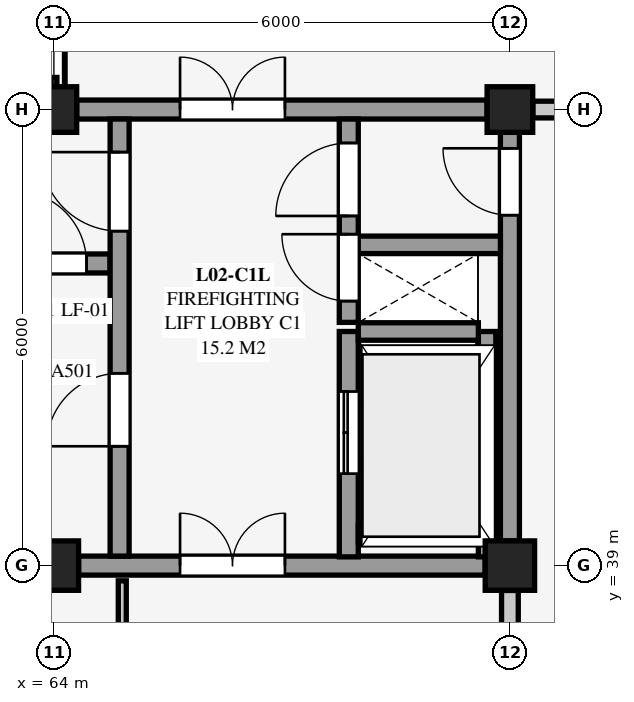
"""IFC4 building model, lengths in metres.
Left out: names, types, materials, properties, quantities, classifications, styles, units other than length and angle.
Written with IfcOpenShell. Run it as: python <this file> out.ifc"""

import sys

from ifc_helpers import new_model, si_unit, direction, frame, frame_2d, origin, origin_2d, place, context, subcontext, project, spatial, rectangle, extrude, element, fill, save


model = new_model("IFC4")
c1 = context("Model", 3, precision=1e-05, world=origin(), true_north=direction((0.0, 1.0)))
c2 = subcontext(c1, "Body", "Model", "MODEL_VIEW")
j1 = project(units=[si_unit("LENGTHUNIT", "METRE"), si_unit("PLANEANGLEUNIT", "RADIAN")], contexts=[c1])
p1 = place(None, origin())
s1 = spatial("IfcSite", under=j1, at=p1, CompositionType="ELEMENT")
p2 = place(p1, origin())
s2 = spatial("IfcBuilding", under=s1, at=p2, CompositionType="ELEMENT")
p3 = place(p2, frame((0.0, 0.0, 4.5)))
s3 = spatial("IfcBuildingStorey", under=s2, at=p3, CompositionType="ELEMENT", Elevation=4.5)
p4 = place(p3, frame((64.0, 39.0, 0.0), z_axis=(0.0, 0.0, 1.0), x_axis=(1.0, 0.0, 0.0)))
e1 = element("IfcColumn", 1, at=p4, inside=s3, PredefinedType="COLUMN", context=c2, shape_type="SweptSolid", body=[
    extrude(rectangle(XDim=0.65, YDim=0.65, at=origin_2d()), origin(), (0.0, 0.0, 1.0), 4.5),
])
p5 = place(p3, frame((64.0, 45.0, 0.0), z_axis=(0.0, 0.0, 1.0), x_axis=(1.0, 0.0, 0.0)))
e2 = element("IfcColumn", 2, at=p5, inside=s3, PredefinedType="COLUMN", context=c2, shape_type="SweptSolid", body=[
    extrude(rectangle(XDim=0.6, YDim=0.6, at=origin_2d()), origin(), (0.0, 0.0, 1.0), 4.5),
])
p6 = place(p3, frame((70.0, 39.0, 0.0), z_axis=(0.0, 0.0, 1.0), x_axis=(1.0, 0.0, 0.0)))
e3 = element("IfcColumn", 3, at=p6, inside=s3, PredefinedType="COLUMN", context=c2, shape_type="SweptSolid", body=[
    extrude(rectangle(XDim=0.65, YDim=0.65, at=origin_2d()), origin(), (0.0, 0.0, 1.0), 4.5),
])
p7 = place(p3, frame((70.0, 45.0, 0.0), z_axis=(0.0, 0.0, 1.0), x_axis=(1.0, 0.0, 0.0)))
e4 = element("IfcColumn", 4, at=p7, inside=s3, PredefinedType="COLUMN", context=c2, shape_type="SweptSolid", body=[
    extrude(rectangle(XDim=0.6, YDim=0.6, at=origin_2d()), origin(), (0.0, 0.0, 1.0), 4.5),
])
p8 = place(p3, frame((64.0, 45.3, 0.0), z_axis=(0.0, 0.0, 1.0), x_axis=(0.0, 1.0, 0.0)))
e5 = element("IfcWall", 5, at=p8, inside=s3, PredefinedType="SOLIDWALL", context=c2, shape_type="SweptSolid", body=[
    extrude(rectangle(XDim=5.425, YDim=0.295, at=frame_2d((2.712, 0.0))), origin(), (0.0, 0.0, 1.0), 0.46),
])
p9 = place(p3, frame((64.325, 39.0, 0.0), z_axis=(0.0, 0.0, 1.0), x_axis=(1.0, 0.0, 0.0)))
e6 = element("IfcWall", 6, at=p9, inside=s3, PredefinedType="SHEAR", context=c2, shape_type="SweptSolid", body=[
    extrude(rectangle(XDim=5.35, YDim=0.25, at=frame_2d((2.675, 0.0))), origin(), (0.0, 0.0, 1.0), 4.228),
])
p10 = place(p9, frame((1.335, 0.0, 0.0)))
e7 = element("IfcOpeningElement", 7, at=p10, cuts=e6, PredefinedType="OPENING", context=c2, shape_type="SweptSolid", body=[
    extrude(rectangle(XDim=1.38, YDim=2.16, at=frame_2d((0.69, 1.08))), frame((0.0, 0.135, 0.0), z_axis=(0.0, -1.0, 0.0), x_axis=(1.0, 0.0, 0.0)), (0.0, 0.0, 1.0), 0.27),
])
p11 = place(p3, frame((64.3, 45.0, 0.0), z_axis=(0.0, 0.0, 1.0), x_axis=(1.0, 0.0, 0.0)))
e8 = element("IfcWall", 8, at=p11, inside=s3, PredefinedType="SHEAR", context=c2, shape_type="SweptSolid", body=[
    extrude(rectangle(XDim=5.4, YDim=0.25, at=frame_2d((2.7, 0.0))), origin(), (0.0, 0.0, 1.0), 4.228),
])
p12 = place(p11, frame((1.36, 0.0, 0.0)))
e9 = element("IfcOpeningElement", 9, at=p12, cuts=e8, PredefinedType="OPENING", context=c2, shape_type="SweptSolid", body=[
    extrude(rectangle(XDim=1.38, YDim=2.16, at=frame_2d((0.69, 1.08))), frame((0.0, 0.135, 0.0), z_axis=(0.0, -1.0, 0.0), x_axis=(1.0, 0.0, 0.0)), (0.0, 0.0, 1.0), 0.27),
])
p13 = place(p3, frame((70.0, 39.325, 0.0), z_axis=(0.0, 0.0, 1.0), x_axis=(0.0, 1.0, 0.0)))
e10 = element("IfcWall", 10, at=p13, inside=s3, PredefinedType="SHEAR", context=c2, shape_type="SweptSolid", body=[
    extrude(rectangle(XDim=5.375, YDim=0.25, at=frame_2d((2.688, 0.0))), origin(), (0.0, 0.0, 1.0), 4.228),
])
p14 = place(p13, frame((4.285, 0.0, 0.0)))
e11 = element("IfcOpeningElement", 11, at=p14, cuts=e10, PredefinedType="OPENING", context=c2, shape_type="SweptSolid", body=[
    extrude(rectangle(XDim=0.88, YDim=2.08, at=frame_2d((0.44, 1.04))), frame((0.0, 0.135, 0.0), z_axis=(0.0, -1.0, 0.0), x_axis=(1.0, 0.0, 0.0)), (0.0, 0.0, 1.0), 0.27),
])
p15 = place(p3, frame((63.16, 42.975, 0.0), z_axis=(0.0, 0.0, 1.0), x_axis=(1.0, 0.0, 0.0)))
e12 = element("IfcWall", 12, at=p15, inside=s3, PredefinedType="SHEAR", context=c2, shape_type="SweptSolid", body=[
    extrude(rectangle(XDim=1.58, YDim=0.25, at=frame_2d((0.79, 0.0))), origin(), (0.0, 0.0, 1.0), 4.228),
])
p16 = place(p15, frame((0.31, 0.0, 0.0)))
e13 = element("IfcOpeningElement", 13, at=p16, cuts=e12, PredefinedType="OPENING", context=c2, shape_type="SweptSolid", body=[
    extrude(rectangle(XDim=0.96, YDim=2.12, at=frame_2d((0.48, 1.06))), frame((0.0, 0.135, 0.0), z_axis=(0.0, -1.0, 0.0), x_axis=(1.0, 0.0, 0.0)), (0.0, 0.0, 1.0), 0.27),
])
p17 = place(p3, frame((64.865, 39.125, 0.0), z_axis=(0.0, 0.0, 1.0), x_axis=(0.0, 1.0, 0.0)))
e14 = element("IfcWall", 14, at=p17, inside=s3, PredefinedType="SHEAR", context=c2, shape_type="SweptSolid", body=[
    extrude(rectangle(XDim=5.75, YDim=0.25, at=frame_2d((2.875, 0.0))), origin(), (0.0, 0.0, 1.0), 4.228),
])
p18 = place(p17, frame((4.275, 0.0, 0.0)))
e15 = element("IfcOpeningElement", 15, at=p18, cuts=e14, PredefinedType="OPENING", context=c2, shape_type="SweptSolid", body=[
    extrude(rectangle(XDim=1.04, YDim=2.14, at=frame_2d((0.52, 1.07))), frame((0.0, 0.135, 0.0), z_axis=(0.0, -1.0, 0.0), x_axis=(1.0, 0.0, 0.0)), (0.0, 0.0, 1.0), 0.27),
])
p19 = place(p17, frame((1.445, 0.0, 0.0)))
e16 = element("IfcOpeningElement", 16, at=p19, cuts=e14, PredefinedType="OPENING", context=c2, shape_type="SweptSolid", body=[
    extrude(rectangle(XDim=0.96, YDim=2.12, at=frame_2d((0.48, 1.06))), frame((0.0, 0.135, 0.0), z_axis=(0.0, -1.0, 0.0), x_axis=(1.0, 0.0, 0.0)), (0.0, 0.0, 1.0), 0.27),
])
p20 = place(p3, frame((67.88, 39.115, 0.0), z_axis=(0.0, 0.0, 1.0), x_axis=(0.0, 1.0, 0.0)))
e17 = element("IfcWall", 17, at=p20, inside=s3, PredefinedType="SHEAR", context=c2, shape_type="SweptSolid", body=[
    extrude(rectangle(XDim=2.965, YDim=0.25, at=frame_2d((1.482, 0.0))), origin(), (0.0, 0.0, 1.0), 4.5),
])
p21 = place(p20, frame((1.095, 0.0, 0.0)))
e18 = element("IfcOpeningElement", 18, at=p21, cuts=e17, PredefinedType="OPENING", context=c2, shape_type="SweptSolid", body=[
    extrude(rectangle(XDim=1.08, YDim=2.15, at=frame_2d((0.54, 1.075))), frame((0.0, 0.135, 0.0), z_axis=(0.0, -1.0, 0.0), x_axis=(1.0, 0.0, 0.0)), (0.0, 0.0, 1.0), 0.27),
])
p22 = place(p3, frame((68.005, 39.42, 0.0), z_axis=(0.0, 0.0, 1.0), x_axis=(1.0, 0.0, 0.0)))
e19 = element("IfcWall", 19, at=p22, inside=s3, PredefinedType="SHEAR", context=c2, shape_type="SweptSolid", body=[
    extrude(rectangle(XDim=1.58, YDim=0.23, at=frame_2d((0.79, 0.0))), origin(), (0.0, 0.0, 1.0), 4.5),
])
p23 = place(p3, frame((69.7, 39.115, 0.0), z_axis=(0.0, 0.0, 1.0), x_axis=(0.0, 1.0, 0.0)))
e20 = element("IfcWall", 20, at=p23, inside=s3, PredefinedType="SHEAR", context=c2, shape_type="SweptSolid", body=[
    extrude(rectangle(XDim=2.965, YDim=0.23, at=frame_2d((1.482, 0.0))), origin(), (0.0, 0.0, 1.0), 4.5),
])
p24 = place(p3, frame((68.005, 42.08, 0.0), z_axis=(0.0, 0.0, 1.0), x_axis=(1.0, 0.0, 0.0)))
e21 = element("IfcWall", 21, at=p24, inside=s3, PredefinedType="SHEAR", context=c2, shape_type="SweptSolid", body=[
    extrude(rectangle(XDim=1.58, YDim=0.23, at=frame_2d((0.79, 0.0))), origin(), (0.0, 0.0, 1.0), 4.5),
])
p25 = place(p3, frame((67.88, 42.2, 0.0), z_axis=(0.0, 0.0, 1.0), x_axis=(0.0, 1.0, 0.0)))
e22 = element("IfcWall", 22, at=p25, inside=s3, PredefinedType="SHEAR", context=c2, shape_type="SweptSolid", body=[
    extrude(rectangle(XDim=2.675, YDim=0.25, at=frame_2d((1.337, 0.0))), origin(), (0.0, 0.0, 1.0), 4.228),
])
p26 = place(p25, frame((0.28, 0.0, 0.0)))
e23 = element("IfcOpeningElement", 23, at=p26, cuts=e22, PredefinedType="OPENING", context=c2, shape_type="SweptSolid", body=[
    extrude(rectangle(XDim=0.88, YDim=2.08, at=frame_2d((0.44, 1.04))), frame((0.0, 0.135, 0.0), z_axis=(0.0, -1.0, 0.0), x_axis=(1.0, 0.0, 0.0)), (0.0, 0.0, 1.0), 0.27),
])
p27 = place(p25, frame((1.4, 0.0, 0.0)))
e24 = element("IfcOpeningElement", 24, at=p27, cuts=e22, PredefinedType="OPENING", context=c2, shape_type="SweptSolid", body=[
    extrude(rectangle(XDim=0.96, YDim=2.12, at=frame_2d((0.48, 1.06))), frame((0.0, 0.135, 0.0), z_axis=(0.0, -1.0, 0.0), x_axis=(1.0, 0.0, 0.0)), (0.0, 0.0, 1.0), 0.27),
])
p28 = place(p3, frame((68.005, 43.22, 0.0), z_axis=(0.0, 0.0, 1.0), x_axis=(1.0, 0.0, 0.0)))
e25 = element("IfcWall", 25, at=p28, inside=s3, PredefinedType="SHEAR", context=c2, shape_type="SweptSolid", body=[
    extrude(rectangle(XDim=1.87, YDim=0.23, at=frame_2d((0.935, 0.0))), origin(), (0.0, 0.0, 1.0), 4.228),
])
p29 = place(p3, frame((64.9, 32.0, 0.0), z_axis=(0.0, 0.0, 1.0), x_axis=(0.0, 1.0, 0.0)))
e26 = element("IfcWall", 26, at=p29, inside=s3, PredefinedType="PARTITIONING", context=c2, shape_type="SweptSolid", body=[
    extrude(rectangle(XDim=6.8, YDim=0.105, at=frame_2d((3.4, 0.0))), origin(), (0.0, 0.0, 1.0), 4.24),
])
p30 = place(p29, frame((2.28, 0.0, 0.0)))
e27 = element("IfcOpeningElement", 27, at=p30, cuts=e26, PredefinedType="OPENING", context=c2, shape_type="SweptSolid", body=[
    extrude(rectangle(XDim=2.24, YDim=2.4, at=frame_2d((1.12, 1.2))), frame((0.0, 0.062, 0.0), z_axis=(0.0, -1.0, 0.0), x_axis=(1.0, 0.0, 0.0)), (0.0, 0.0, 1.0), 0.125),
])
p31 = place(p3, frame((70.0, 33.252, 0.0), z_axis=(0.0, 0.0, 1.0), x_axis=(0.0, 1.0, 0.0)))
e28 = element("IfcWall", 28, at=p31, inside=s3, PredefinedType="SOLIDWALL", context=c2, shape_type="SweptSolid", body=[
    extrude(rectangle(XDim=5.421, YDim=0.22, at=frame_2d((2.71, 0.0))), origin(), (0.0, 0.0, 1.0), 3.874),
])
p32 = place(p31, frame((1.92, 0.0, 0.0)))
e29 = element("IfcOpeningElement", 29, at=p32, cuts=e28, PredefinedType="OPENING", context=c2, shape_type="SweptSolid", body=[
    extrude(rectangle(XDim=1.58, YDim=2.2, at=frame_2d((0.79, 1.1))), frame((0.0, 0.12, 0.0), z_axis=(0.0, -1.0, 0.0), x_axis=(1.0, 0.0, 0.0)), (0.0, 0.0, 1.0), 0.24),
])
p33 = place(p3, frame((70.302, 45.0, 0.0), z_axis=(0.0, 0.0, 1.0), x_axis=(1.0, 0.0, 0.0)))
e30 = element("IfcWall", 30, at=p33, inside=s3, PredefinedType="SOLIDWALL", context=c2, shape_type="SweptSolid", body=[
    extrude(rectangle(XDim=5.421, YDim=0.22, at=frame_2d((2.71, 0.0))), origin(), (0.0, 0.0, 1.0), 3.765),
])
p34 = place(p33, frame((2.24, 0.0, 0.0)))
e31 = element("IfcOpeningElement", 31, at=p34, cuts=e30, PredefinedType="OPENING", context=c2, shape_type="SweptSolid", body=[
    extrude(rectangle(XDim=0.94, YDim=2.1, at=frame_2d((0.47, 1.05))), frame((0.0, 0.12, 0.0), z_axis=(0.0, -1.0, 0.0), x_axis=(1.0, 0.0, 0.0)), (0.0, 0.0, 1.0), 0.24),
])
p35 = place(p10, origin())
e32 = element("IfcDoor", 32, at=p35, inside=s3, OperationType="DOUBLE_DOOR_SINGLE_SWING", PredefinedType="DOOR", context=c2, shape_type="SweptSolid", body=[
    extrude(rectangle(XDim=1.38, YDim=2.16, at=frame_2d((0.69, 1.08))), frame((0.0, 0.025, 0.0), z_axis=(0.0, -1.0, 0.0), x_axis=(1.0, 0.0, 0.0)), (0.0, 0.0, 1.0), 0.05),
])
fill(e7, e32)
p36 = place(p12, origin())
e33 = element("IfcDoor", 33, at=p36, inside=s3, OperationType="DOUBLE_DOOR_SINGLE_SWING", PredefinedType="DOOR", context=c2, shape_type="SweptSolid", body=[
    extrude(rectangle(XDim=1.38, YDim=2.16, at=frame_2d((0.69, 1.08))), frame((0.0, 0.025, 0.0), z_axis=(0.0, -1.0, 0.0), x_axis=(1.0, 0.0, 0.0)), (0.0, 0.0, 1.0), 0.05),
])
fill(e9, e33)
p37 = place(p14, origin())
e34 = element("IfcDoor", 34, at=p37, inside=s3, OperationType="SINGLE_SWING_RIGHT", PredefinedType="DOOR", context=c2, shape_type="SweptSolid", body=[
    extrude(rectangle(XDim=0.88, YDim=2.08, at=frame_2d((0.44, 1.04))), frame((0.0, 0.025, 0.0), z_axis=(0.0, -1.0, 0.0), x_axis=(1.0, 0.0, 0.0)), (0.0, 0.0, 1.0), 0.05),
])
fill(e11, e34)
p38 = place(p16, origin())
e35 = element("IfcDoor", 35, at=p38, inside=s3, OperationType="SINGLE_SWING_LEFT", PredefinedType="DOOR", context=c2, shape_type="SweptSolid", body=[
    extrude(rectangle(XDim=0.96, YDim=2.12, at=frame_2d((0.48, 1.06))), frame((0.0, 0.025, 0.0), z_axis=(0.0, -1.0, 0.0), x_axis=(1.0, 0.0, 0.0)), (0.0, 0.0, 1.0), 0.05),
])
fill(e13, e35)
p39 = place(p18, origin())
e36 = element("IfcDoor", 36, at=p39, inside=s3, OperationType="SINGLE_SWING_RIGHT", PredefinedType="DOOR", context=c2, shape_type="SweptSolid", body=[
    extrude(rectangle(XDim=1.04, YDim=2.14, at=frame_2d((0.52, 1.07))), frame((0.0, 0.025, 0.0), z_axis=(0.0, -1.0, 0.0), x_axis=(1.0, 0.0, 0.0)), (0.0, 0.0, 1.0), 0.05),
])
fill(e15, e36)
p40 = place(p19, origin())
e37 = element("IfcDoor", 37, at=p40, inside=s3, OperationType="SINGLE_SWING_LEFT", PredefinedType="DOOR", context=c2, shape_type="SweptSolid", body=[
    extrude(rectangle(XDim=0.96, YDim=2.12, at=frame_2d((0.48, 1.06))), frame((0.0, 0.025, 0.0), z_axis=(0.0, -1.0, 0.0), x_axis=(1.0, 0.0, 0.0)), (0.0, 0.0, 1.0), 0.05),
])
fill(e16, e37)
p41 = place(p21, origin())
e38 = element("IfcDoor", 38, at=p41, inside=s3, OperationType="DOUBLE_DOOR_SLIDING", PredefinedType="DOOR", context=c2, shape_type="SweptSolid", body=[
    extrude(rectangle(XDim=1.08, YDim=2.15, at=frame_2d((0.54, 1.075))), frame((0.0, 0.025, 0.0), z_axis=(0.0, -1.0, 0.0), x_axis=(1.0, 0.0, 0.0)), (0.0, 0.0, 1.0), 0.05),
])
fill(e18, e38)
p42 = place(p26, origin())
e39 = element("IfcDoor", 39, at=p42, inside=s3, OperationType="SINGLE_SWING_RIGHT", PredefinedType="DOOR", context=c2, shape_type="SweptSolid", body=[
    extrude(rectangle(XDim=0.88, YDim=2.08, at=frame_2d((0.44, 1.04))), frame((0.0, 0.025, 0.0), z_axis=(0.0, -1.0, 0.0), x_axis=(1.0, 0.0, 0.0)), (0.0, 0.0, 1.0), 0.05),
])
fill(e23, e39)
p43 = place(p27, origin())
e40 = element("IfcDoor", 40, at=p43, inside=s3, OperationType="SINGLE_SWING_LEFT", PredefinedType="DOOR", context=c2, shape_type="SweptSolid", body=[
    extrude(rectangle(XDim=0.96, YDim=2.12, at=frame_2d((0.48, 1.06))), frame((0.0, 0.025, 0.0), z_axis=(0.0, -1.0, 0.0), x_axis=(1.0, 0.0, 0.0)), (0.0, 0.0, 1.0), 0.05),
])
fill(e24, e40)
save(model, sys.argv[1])
